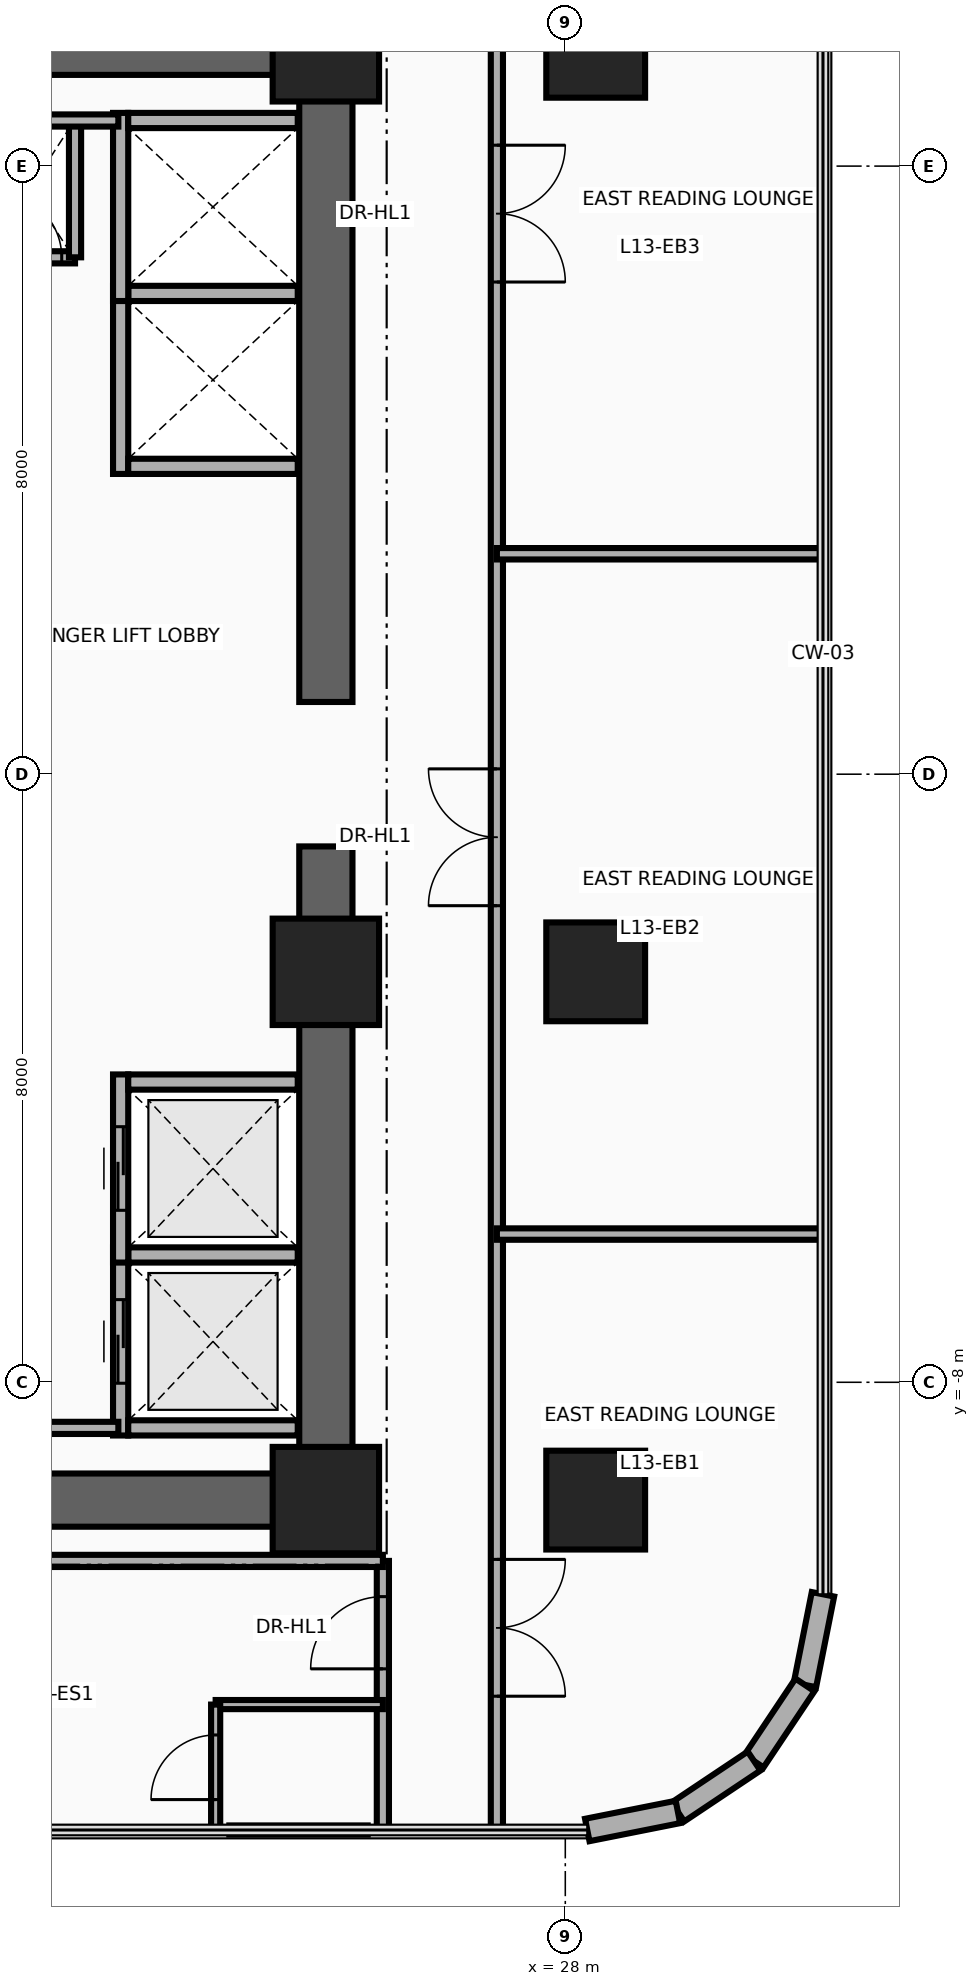
"""IFC4 building model, lengths in metres.
Left out: names, types, materials, properties, quantities, classifications, styles, units other than length and angle.
Written with IfcOpenShell. Run it as: python <this file> out.ifc"""

import sys

from ifc_helpers import new_model, si_unit, direction, frame, frame_2d, origin, origin_2d, place, context, subcontext, project, spatial, rectangle, circle, extrude, source, transform, mapped, element, fill, save


model = new_model("IFC4")
c1 = context("Model", 3, precision=1e-05, world=origin(), true_north=direction((0.0, 1.0)))
c2 = subcontext(c1, "Body", "Model", "MODEL_VIEW")
j1 = project(units=[si_unit("LENGTHUNIT", "METRE"), si_unit("PLANEANGLEUNIT", "RADIAN")], contexts=[c1])
p1 = place(None, origin())
s1 = spatial("IfcSite", under=j1, at=p1, CompositionType="ELEMENT")
p2 = place(p1, origin())
s2 = spatial("IfcBuilding", under=s1, at=p2, CompositionType="ELEMENT")
p3 = place(p2, frame((0.0, 0.0, 55.6)))
s3 = spatial("IfcBuildingStorey", under=s2, at=p3, CompositionType="ELEMENT", Elevation=55.6)
for number, where, z_axis, x_axis in (
    (1, (24.85, -9.9, 0.0), (0.0, 0.0, 1.0), (0.0, 1.0, 0.0)),
    (2, (24.85, 0.95, 0.0), (0.0, 0.0, 1.0), (0.0, 1.0, 0.0)),
):
    element("IfcWall", number, at=place(p3, frame(where, z_axis=z_axis, x_axis=x_axis)), inside=s3, PredefinedType="SHEAR", context=c2, shape_type="SweptSolid", body=[
        extrude(rectangle(XDim=8.95, YDim=0.7, at=frame_2d((4.475, 0.0))), origin(), (0.0, 0.0, 1.0), 3.46),
    ])
for number, where, z_axis, x_axis in (
    (3, (15.85, 9.55, 0.0), (0.0, 0.0, 1.0), (1.0, 0.0, 0.0)),
    (4, (15.85, -9.55, 0.0), (0.0, 0.0, 1.0), (1.0, 0.0, 0.0)),
):
    element("IfcWall", number, at=place(p3, frame(where, z_axis=z_axis, x_axis=x_axis)), inside=s3, PredefinedType="SHEAR", context=c2, shape_type="SweptSolid", body=[
        extrude(rectangle(XDim=9.0, YDim=0.7, at=frame_2d((4.5, 0.0))), origin(), (0.0, 0.0, 1.0), 3.46),
    ])
m1 = source(origin(), c2, "Body", "SweptSolid", [
    extrude(rectangle(XDim=1.4, YDim=1.4, at=origin_2d()), origin(), (0.0, 0.0, 1.0), 3.7),
])
p4 = place(p3, frame((24.85, -9.55, 0.0), z_axis=(0.0, 0.0, 1.0), x_axis=(1.0, 0.0, 0.0)))
e5 = element("IfcColumn", 5, at=p4, inside=s3, PredefinedType="COLUMN", context=c2, shape_type="MappedRepresentation", body=[
    mapped(m1, transform((0.0, 0.0, 0.0), x_axis=(1.0, 0.0, 0.0), y_axis=(0.0, 1.0, 0.0), z_axis=(0.0, 0.0, 1.0), scale=1.0)),
])
m2 = source(origin(), c2, "Body", "SweptSolid", [
    extrude(circle(Radius=0.65, at=origin_2d()), origin(), (0.0, 0.0, 1.0), 3.7),
])
p5 = place(p3, frame((28.4, -9.55, 0.0), z_axis=(0.0, 0.0, 1.0), x_axis=(1.0, 0.0, 0.0)))
e6 = element("IfcColumn", 6, at=p5, inside=s3, PredefinedType="COLUMN", context=c2, shape_type="MappedRepresentation", body=[
    mapped(m2, transform((0.0, 0.0, 0.0), x_axis=(1.0, 0.0, 0.0), y_axis=(0.0, 1.0, 0.0), z_axis=(0.0, 0.0, 1.0), scale=1.0)),
])
p6 = place(p3, frame((24.85, -2.6, 0.0), z_axis=(0.0, 0.0, 1.0), x_axis=(1.0, 0.0, 0.0)))
e7 = element("IfcColumn", 7, at=p6, inside=s3, PredefinedType="COLUMN", context=c2, shape_type="MappedRepresentation", body=[
    mapped(m1, transform((0.0, 0.0, 0.0), x_axis=(1.0, 0.0, 0.0), y_axis=(0.0, 1.0, 0.0), z_axis=(0.0, 0.0, 1.0), scale=1.0)),
])
p7 = place(p3, frame((28.4, -2.6, 0.0), z_axis=(0.0, 0.0, 1.0), x_axis=(1.0, 0.0, 0.0)))
e8 = element("IfcColumn", 8, at=p7, inside=s3, PredefinedType="COLUMN", context=c2, shape_type="MappedRepresentation", body=[
    mapped(m2, transform((0.0, 0.0, 0.0), x_axis=(1.0, 0.0, 0.0), y_axis=(0.0, 1.0, 0.0), z_axis=(0.0, 0.0, 1.0), scale=1.0)),
])
p8 = place(p3, frame((24.85, 9.55, 0.0), z_axis=(0.0, 0.0, 1.0), x_axis=(1.0, 0.0, 0.0)))
e9 = element("IfcColumn", 9, at=p8, inside=s3, PredefinedType="COLUMN", context=c2, shape_type="MappedRepresentation", body=[
    mapped(m1, transform((0.0, 0.0, 0.0), x_axis=(1.0, 0.0, 0.0), y_axis=(0.0, 1.0, 0.0), z_axis=(0.0, 0.0, 1.0), scale=1.0)),
])
p9 = place(p3, frame((28.4, 9.55, 0.0), z_axis=(0.0, 0.0, 1.0), x_axis=(1.0, 0.0, 0.0)))
e10 = element("IfcColumn", 10, at=p9, inside=s3, PredefinedType="COLUMN", context=c2, shape_type="MappedRepresentation", body=[
    mapped(m2, transform((0.0, 0.0, 0.0), x_axis=(1.0, 0.0, 0.0), y_axis=(0.0, 1.0, 0.0), z_axis=(0.0, 0.0, 1.0), scale=1.0)),
])
p10 = place(p3, frame((31.39, -10.789, 0.0), z_axis=(0.0, 0.0, 1.0), x_axis=(-0.194996050505, -0.980804027463, 0.0)))
e11 = element("IfcWall", 11, at=p10, inside=s3, PredefinedType="SOLIDWALL", context=c2, shape_type="SweptSolid", body=[
    extrude(rectangle(XDim=1.216, YDim=0.3, at=frame_2d((0.608, 0.0))), origin(), (0.0, 0.0, 1.0), 3.46),
])
for number, where, z_axis, x_axis in (
    (12, (31.153, -11.982, 0.0), (0.0, 0.0, 1.0), (-0.556, -0.831, 0.0)),
    (13, (30.483, -12.983, 0.0), (0.0, 0.0, 1.0), (-0.831, -0.556, 0.0)),
):
    element("IfcWall", number, at=place(p3, frame(where, z_axis=z_axis, x_axis=x_axis)), inside=s3, PredefinedType="SOLIDWALL", context=c2, shape_type="SweptSolid", body=[
        extrude(rectangle(XDim=1.205, YDim=0.3, at=frame_2d((0.603, 0.0))), origin(), (0.0, 0.0, 1.0), 3.46),
    ])
p11 = place(p3, frame((29.482, -13.653, 0.0), z_axis=(0.0, 0.0, 1.0), x_axis=(-0.980804027463, -0.194996050505, 0.0)))
e14 = element("IfcWall", 14, at=p11, inside=s3, PredefinedType="SOLIDWALL", context=c2, shape_type="SweptSolid", body=[
    extrude(rectangle(XDim=1.216, YDim=0.3, at=frame_2d((0.608, 0.0))), origin(), (0.0, 0.0, 1.0), 3.46),
])
p12 = place(p3, frame((22.15, -8.7, 0.0), z_axis=(0.0, 0.0, 1.0), x_axis=(0.0, 1.0, 0.0)))
e15 = element("IfcWall", 15, at=p12, inside=s3, PredefinedType="MOVABLE", context=c2, shape_type="SweptSolid", body=[
    extrude(rectangle(XDim=2.475, YDim=0.2, at=frame_2d((1.237, 0.0))), origin(), (0.0, 0.0, 1.0), 3.46),
])
p13 = place(p12, frame((0.688, 0.0, 0.0)))
e16 = element("IfcOpeningElement", 16, at=p13, cuts=e15, PredefinedType="OPENING", context=c2, shape_type="SweptSolid", body=[
    extrude(rectangle(XDim=1.1, YDim=2.1, at=frame_2d((0.55, 1.05))), frame((0.0, 0.115, 0.0), z_axis=(0.0, -1.0, 0.0), x_axis=(1.0, 0.0, 0.0)), (0.0, 0.0, 1.0), 0.23),
])
for number, where, z_axis, x_axis in (
    (17, (22.25, -8.6, 0.0), (0.0, 0.0, 1.0), (1.0, 0.0, 0.0)),
    (18, (22.25, -6.325, 0.0), (0.0, 0.0, 1.0), (1.0, 0.0, 0.0)),
):
    element("IfcWall", number, at=place(p3, frame(where, z_axis=z_axis, x_axis=x_axis)), inside=s3, PredefinedType="MOVABLE", context=c2, shape_type="SweptSolid", body=[
        extrude(rectangle(XDim=2.23, YDim=0.2, at=frame_2d((1.115, 0.0))), origin(), (0.0, 0.0, 1.0), 3.46),
    ])
p14 = place(p3, frame((22.15, -6.425, 0.0), z_axis=(0.0, 0.0, 1.0), x_axis=(0.0, 1.0, 0.0)))
e19 = element("IfcWall", 19, at=p14, inside=s3, PredefinedType="MOVABLE", context=c2, shape_type="SweptSolid", body=[
    extrude(rectangle(XDim=2.475, YDim=0.2, at=frame_2d((1.238, 0.0))), origin(), (0.0, 0.0, 1.0), 3.46),
])
p15 = place(p14, frame((0.688, 0.0, 0.0)))
e20 = element("IfcOpeningElement", 20, at=p15, cuts=e19, PredefinedType="OPENING", context=c2, shape_type="SweptSolid", body=[
    extrude(rectangle(XDim=1.1, YDim=2.1, at=frame_2d((0.55, 1.05))), frame((0.0, 0.115, 0.0), z_axis=(0.0, -1.0, 0.0), x_axis=(1.0, 0.0, 0.0)), (0.0, 0.0, 1.0), 0.23),
])
p16 = place(p3, frame((22.25, -4.05, 0.0), z_axis=(0.0, 0.0, 1.0), x_axis=(1.0, 0.0, 0.0)))
e21 = element("IfcWall", 21, at=p16, inside=s3, PredefinedType="MOVABLE", context=c2, shape_type="SweptSolid", body=[
    extrude(rectangle(XDim=2.23, YDim=0.2, at=frame_2d((1.115, 0.0))), origin(), (0.0, 0.0, 1.0), 3.46),
])
p17 = place(p3, frame((22.15, 3.95, 0.0), z_axis=(0.0, 0.0, 1.0), x_axis=(0.0, 1.0, 0.0)))
e22 = element("IfcWall", 22, at=p17, inside=s3, PredefinedType="MOVABLE", context=c2, shape_type="SweptSolid", body=[
    extrude(rectangle(XDim=2.475, YDim=0.2, at=frame_2d((1.238, 0.0))), origin(), (0.0, 0.0, 1.0), 3.46),
])
for number, where, z_axis, x_axis in (
    (23, (22.25, 4.05, 0.0), (0.0, 0.0, 1.0), (1.0, 0.0, 0.0)),
    (24, (22.25, 6.325, 0.0), (0.0, 0.0, 1.0), (1.0, 0.0, 0.0)),
):
    element("IfcWall", number, at=place(p3, frame(where, z_axis=z_axis, x_axis=x_axis)), inside=s3, PredefinedType="MOVABLE", context=c2, shape_type="SweptSolid", body=[
        extrude(rectangle(XDim=2.23, YDim=0.2, at=frame_2d((1.115, 0.0))), origin(), (0.0, 0.0, 1.0), 2.245),
    ])
p18 = place(p3, frame((22.15, 6.225, 0.0), z_axis=(0.0, 0.0, 1.0), x_axis=(0.0, 1.0, 0.0)))
e25 = element("IfcWall", 25, at=p18, inside=s3, PredefinedType="MOVABLE", context=c2, shape_type="SweptSolid", body=[
    extrude(rectangle(XDim=2.475, YDim=0.2, at=frame_2d((1.237, 0.0))), origin(), (0.0, 0.0, 1.0), 3.46),
])
p19 = place(p3, frame((22.25, 8.6, 0.0), z_axis=(0.0, 0.0, 1.0), x_axis=(1.0, 0.0, 0.0)))
e26 = element("IfcWall", 26, at=p19, inside=s3, PredefinedType="MOVABLE", context=c2, shape_type="SweptSolid", body=[
    extrude(rectangle(XDim=2.23, YDim=0.2, at=frame_2d((1.115, 0.0))), origin(), (0.0, 0.0, 1.0), 2.245),
])
p20 = place(p3, frame((20.35, 6.8, 0.0), z_axis=(0.0, 0.0, 1.0), x_axis=(1.0, 0.0, 0.0)))
e27 = element("IfcWall", 27, at=p20, inside=s3, PredefinedType="PARTITIONING", context=c2, shape_type="SweptSolid", body=[
    extrude(rectangle(XDim=1.2, YDim=0.16, at=frame_2d((0.6, 0.0))), origin(), (0.0, 0.0, 1.0), 3.46),
])
p21 = place(p20, frame((0.175, 0.0, 0.0)))
e28 = element("IfcOpeningElement", 28, at=p21, cuts=e27, PredefinedType="OPENING", context=c2, shape_type="SweptSolid", body=[
    extrude(rectangle(XDim=0.85, YDim=2.05, at=frame_2d((0.425, 1.025))), frame((0.0, 0.095, 0.0), z_axis=(0.0, -1.0, 0.0), x_axis=(1.0, 0.0, 0.0)), (0.0, 0.0, 1.0), 0.19),
])
p22 = place(p3, frame((21.55, 6.8, 0.0), z_axis=(0.0, 0.0, 1.0), x_axis=(0.0, 1.0, 0.0)))
e29 = element("IfcWall", 29, at=p22, inside=s3, PredefinedType="PARTITIONING", context=c2, shape_type="SweptSolid", body=[
    extrude(rectangle(XDim=1.8, YDim=0.16, at=frame_2d((0.9, 0.0))), origin(), (0.0, 0.0, 1.0), 3.46),
])
for number, where, z_axis, x_axis in (
    (30, (20.3, -8.6, 0.0), (0.0, 0.0, 1.0), (1.0, 0.0, 0.0)),
    (31, (20.3, 8.6, 0.0), (0.0, 0.0, 1.0), (1.0, 0.0, 0.0)),
):
    element("IfcWall", number, at=place(p3, frame(where, z_axis=z_axis, x_axis=x_axis)), inside=s3, PredefinedType="PARTITIONING", context=c2, shape_type="SweptSolid", body=[
        extrude(rectangle(XDim=1.82, YDim=0.16, at=frame_2d((0.91, 0.0))), origin(), (0.0, 0.0, 1.0), 3.46),
    ])
p23 = place(p3, frame((25.6, -13.89, 0.0), z_axis=(0.0, 0.0, 1.0), x_axis=(0.0, 1.0, 0.0)))
e32 = element("IfcWall", 32, at=p23, inside=s3, PredefinedType="PARTITIONING", context=c2, shape_type="SweptSolid", body=[
    extrude(rectangle(XDim=3.54, YDim=0.16, at=frame_2d((1.77, 0.0))), origin(), (0.0, 0.0, 1.0), 3.46),
])
p24 = place(p23, frame((2.12, 0.0, 0.0)))
e33 = element("IfcOpeningElement", 33, at=p24, cuts=e32, PredefinedType="OPENING", context=c2, shape_type="SweptSolid", body=[
    extrude(rectangle(XDim=0.95, YDim=2.15, at=frame_2d((0.475, 1.075))), frame((0.0, 0.095, 0.0), z_axis=(0.0, -1.0, 0.0), x_axis=(1.0, 0.0, 0.0)), (0.0, 0.0, 1.0), 0.19),
])
p25 = place(p3, frame((13.41, -10.35, 0.0), z_axis=(0.0, 0.0, 1.0), x_axis=(1.0, 0.0, 0.0)))
e34 = element("IfcWall", 34, at=p25, inside=s3, PredefinedType="PARTITIONING", context=c2, shape_type="SweptSolid", body=[
    extrude(rectangle(XDim=12.19, YDim=0.16, at=frame_2d((6.095, 0.0))), origin(), (0.0, 0.0, 1.0), 3.46),
])
p26 = place(p3, frame((23.4, -12.24, 0.0), z_axis=(0.0, 0.0, 1.0), x_axis=(1.0, 0.0, 0.0)))
e35 = element("IfcWall", 35, at=p26, inside=s3, PredefinedType="PARTITIONING", context=c2, shape_type="SweptSolid", body=[
    extrude(rectangle(XDim=2.2, YDim=0.12, at=frame_2d((1.1, 0.0))), origin(), (0.0, 0.0, 1.0), 3.46),
])
p27 = place(p3, frame((23.4, -13.89, 0.0), z_axis=(0.0, 0.0, 1.0), x_axis=(0.0, 1.0, 0.0)))
e36 = element("IfcWall", 36, at=p27, inside=s3, PredefinedType="PARTITIONING", context=c2, shape_type="SweptSolid", body=[
    extrude(rectangle(XDim=1.65, YDim=0.12, at=frame_2d((0.825, 0.0))), origin(), (0.0, 0.0, 1.0), 3.46),
])
p28 = place(p27, frame((0.4, 0.0, 0.0)))
e37 = element("IfcOpeningElement", 37, at=p28, cuts=e36, PredefinedType="OPENING", context=c2, shape_type="SweptSolid", body=[
    extrude(rectangle(XDim=0.85, YDim=2.1, at=frame_2d((0.425, 1.05))), frame((0.0, 0.075, 0.0), z_axis=(0.0, -1.0, 0.0), x_axis=(1.0, 0.0, 0.0)), (0.0, 0.0, 1.0), 0.15),
])
p29 = place(p3, frame((23.58, -13.89, 0.0), z_axis=(0.0, 0.0, 1.0), x_axis=(1.0, 0.0, 0.0)))
e38 = element("IfcWall", 38, at=p29, inside=s3, PredefinedType="PARTITIONING", context=c2, shape_type="SweptSolid", body=[
    extrude(rectangle(XDim=1.82, YDim=0.12, at=frame_2d((0.91, 0.0))), origin(), (0.0, 0.0, 1.0), 3.46),
])
p30 = place(p3, frame((27.1, -13.89, 0.0), z_axis=(0.0, 0.0, 1.0), x_axis=(0.0, 1.0, 0.0)))
e39 = element("IfcWall", 39, at=p30, inside=s3, PredefinedType="PARTITIONING", context=c2, shape_type="SweptSolid", body=[
    extrude(rectangle(XDim=25.74, YDim=0.16, at=frame_2d((12.87, 0.0))), origin(), (0.0, 0.0, 1.0), 2.583),
])
p31 = place(p30, frame((1.76, 0.0, 0.0)))
e40 = element("IfcOpeningElement", 40, at=p31, cuts=e39, PredefinedType="OPENING", context=c2, shape_type="SweptSolid", body=[
    extrude(rectangle(XDim=1.8, YDim=2.15, at=frame_2d((0.9, 1.075))), frame((0.0, 0.095, 0.0), z_axis=(0.0, -1.0, 0.0), x_axis=(1.0, 0.0, 0.0)), (0.0, 0.0, 1.0), 0.19),
])
p32 = place(p30, frame((12.16, 0.0, 0.0)))
e41 = element("IfcOpeningElement", 41, at=p32, cuts=e39, PredefinedType="OPENING", context=c2, shape_type="SweptSolid", body=[
    extrude(rectangle(XDim=1.8, YDim=2.15, at=frame_2d((0.9, 1.075))), frame((0.0, 0.095, 0.0), z_axis=(0.0, -1.0, 0.0), x_axis=(1.0, 0.0, 0.0)), (0.0, 0.0, 1.0), 0.19),
])
p33 = place(p30, frame((20.365, 0.0, 0.0)))
e42 = element("IfcOpeningElement", 42, at=p33, cuts=e39, PredefinedType="OPENING", context=c2, shape_type="SweptSolid", body=[
    extrude(rectangle(XDim=1.8, YDim=2.15, at=frame_2d((0.9, 1.075))), frame((0.0, 0.095, 0.0), z_axis=(0.0, -1.0, 0.0), x_axis=(1.0, 0.0, 0.0)), (0.0, 0.0, 1.0), 0.19),
])
for number, where, z_axis, x_axis in (
    (43, (27.1, -6.05, 0.0), (0.0, 0.0, 1.0), (1.0, 0.0, 0.0)),
    (44, (27.1, 2.9, 0.0), (0.0, 0.0, 1.0), (1.0, 0.0, 0.0)),
):
    element("IfcWall", number, at=place(p3, frame(where, z_axis=z_axis, x_axis=x_axis)), inside=s3, PredefinedType="PARTITIONING", context=c2, shape_type="SweptSolid", body=[
        extrude(rectangle(XDim=4.29, YDim=0.15, at=frame_2d((2.145, 0.0))), origin(), (0.0, 0.0, 1.0), 2.896),
    ])
p34 = place(p13, origin())
e45 = element("IfcDoor", 45, at=p34, inside=s3, OperationType="DOUBLE_DOOR_SLIDING", PredefinedType="DOOR", context=c2, shape_type="SweptSolid", body=[
    extrude(rectangle(XDim=1.1, YDim=2.1, at=frame_2d((0.55, 1.05))), frame((0.0, 0.025, 0.0), z_axis=(0.0, -1.0, 0.0), x_axis=(1.0, 0.0, 0.0)), (0.0, 0.0, 1.0), 0.05),
])
fill(e16, e45)
p35 = place(p15, origin())
e46 = element("IfcDoor", 46, at=p35, inside=s3, OperationType="DOUBLE_DOOR_SLIDING", PredefinedType="DOOR", context=c2, shape_type="SweptSolid", body=[
    extrude(rectangle(XDim=1.1, YDim=2.1, at=frame_2d((0.55, 1.05))), frame((0.0, 0.025, 0.0), z_axis=(0.0, -1.0, 0.0), x_axis=(1.0, 0.0, 0.0)), (0.0, 0.0, 1.0), 0.05),
])
fill(e20, e46)
p36 = place(p21, origin())
e47 = element("IfcDoor", 47, at=p36, inside=s3, OperationType="SINGLE_SWING_LEFT", PredefinedType="DOOR", context=c2, shape_type="SweptSolid", body=[
    extrude(rectangle(XDim=0.85, YDim=2.05, at=frame_2d((0.425, 1.025))), frame((0.0, 0.025, 0.0), z_axis=(0.0, -1.0, 0.0), x_axis=(1.0, 0.0, 0.0)), (0.0, 0.0, 1.0), 0.05),
])
fill(e28, e47)
p37 = place(p24, origin())
e48 = element("IfcDoor", 48, at=p37, inside=s3, OperationType="SINGLE_SWING_RIGHT", PredefinedType="DOOR", context=c2, shape_type="SweptSolid", body=[
    extrude(rectangle(XDim=0.95, YDim=2.15, at=frame_2d((0.475, 1.075))), frame((0.0, 0.025, 0.0), z_axis=(0.0, -1.0, 0.0), x_axis=(1.0, 0.0, 0.0)), (0.0, 0.0, 1.0), 0.05),
])
fill(e33, e48)
p38 = place(p28, origin())
e49 = element("IfcDoor", 49, at=p38, inside=s3, OperationType="SINGLE_SWING_LEFT", PredefinedType="DOOR", context=c2, shape_type="SweptSolid", body=[
    extrude(rectangle(XDim=0.85, YDim=2.1, at=frame_2d((0.425, 1.05))), frame((0.0, 0.025, 0.0), z_axis=(0.0, -1.0, 0.0), x_axis=(1.0, 0.0, 0.0)), (0.0, 0.0, 1.0), 0.05),
])
fill(e37, e49)
p39 = place(p31, frame((1.8, 0.0, 0.0), z_axis=(0.0, 0.0, 1.0), x_axis=(-1.0, 0.0, 0.0)))
e50 = element("IfcDoor", 50, at=p39, inside=s3, OperationType="DOUBLE_DOOR_SINGLE_SWING", PredefinedType="DOOR", context=c2, shape_type="SweptSolid", body=[
    extrude(rectangle(XDim=1.8, YDim=2.15, at=frame_2d((0.9, 1.075))), frame((0.0, 0.025, 0.0), z_axis=(0.0, -1.0, 0.0), x_axis=(1.0, 0.0, 0.0)), (0.0, 0.0, 1.0), 0.05),
])
fill(e40, e50)
p40 = place(p32, origin())
e51 = element("IfcDoor", 51, at=p40, inside=s3, OperationType="DOUBLE_DOOR_SINGLE_SWING", PredefinedType="DOOR", context=c2, shape_type="SweptSolid", body=[
    extrude(rectangle(XDim=1.8, YDim=2.15, at=frame_2d((0.9, 1.075))), frame((0.0, 0.025, 0.0), z_axis=(0.0, -1.0, 0.0), x_axis=(1.0, 0.0, 0.0)), (0.0, 0.0, 1.0), 0.05),
])
fill(e41, e51)
p41 = place(p33, frame((1.8, 0.0, 0.0), z_axis=(0.0, 0.0, 1.0), x_axis=(-1.0, 0.0, 0.0)))
e52 = element("IfcDoor", 52, at=p41, inside=s3, OperationType="DOUBLE_DOOR_SINGLE_SWING", PredefinedType="DOOR", context=c2, shape_type="SweptSolid", body=[
    extrude(rectangle(XDim=1.8, YDim=2.15, at=frame_2d((0.9, 1.075))), frame((0.0, 0.025, 0.0), z_axis=(0.0, -1.0, 0.0), x_axis=(1.0, 0.0, 0.0)), (0.0, 0.0, 1.0), 0.05),
])
fill(e42, e52)
save(model, sys.argv[1])
